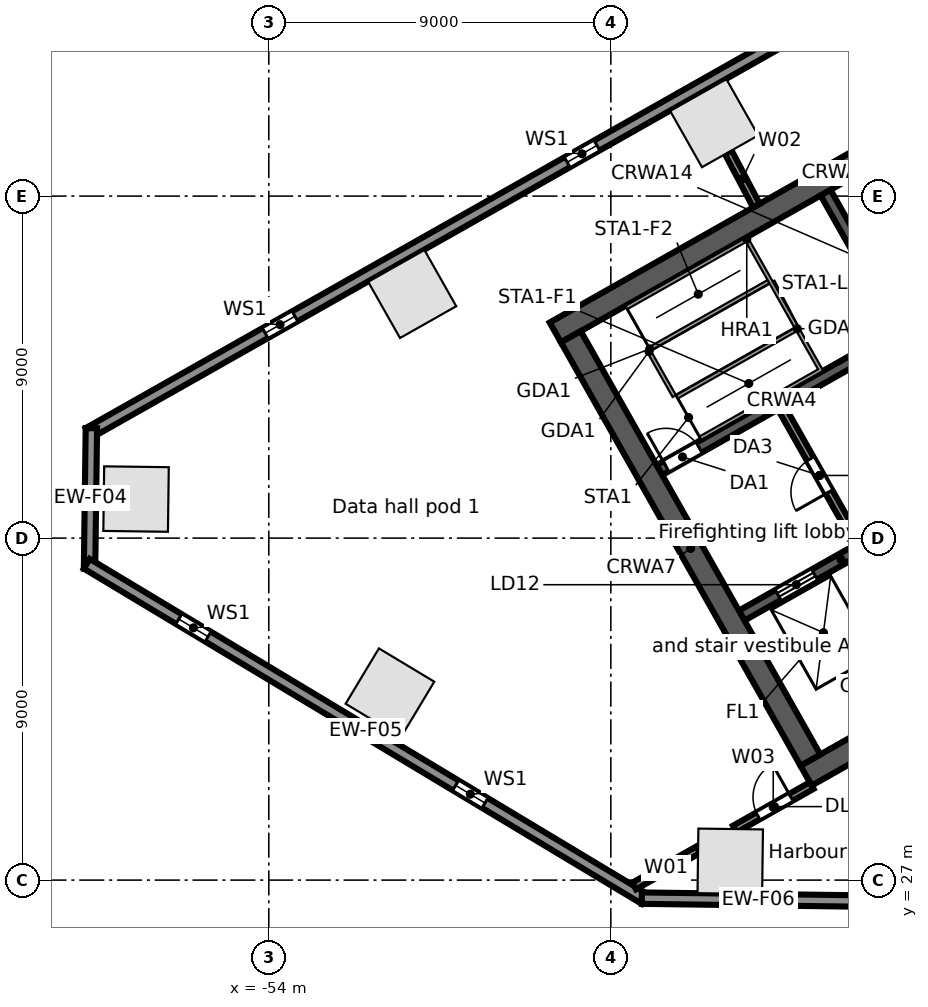
"""IFC4 building model, lengths in metres.
Left out: names, types, materials, properties, quantities, classifications, styles, units other than length and angle.
Written with IfcOpenShell. Run it as: python <this file> out.ifc"""

import sys

from ifc_helpers import new_model, si_unit, direction, frame, frame_2d, origin, origin_2d, place, context, subcontext, project, spatial, rectangle, extrude, element, fill, save


model = new_model("IFC4")
c1 = context("Model", 3, precision=1e-05, world=origin(), true_north=direction((0.0, 1.0)))
c2 = subcontext(c1, "Body", "Model", "MODEL_VIEW")
j1 = project(units=[si_unit("LENGTHUNIT", "METRE"), si_unit("PLANEANGLEUNIT", "RADIAN")], contexts=[c1])
p1 = place(None, origin())
s1 = spatial("IfcSite", under=j1, at=p1, CompositionType="ELEMENT")
p2 = place(p1, origin())
s2 = spatial("IfcBuilding", under=s1, at=p2, CompositionType="ELEMENT")
p3 = place(p2, frame((0.0, 0.0, 71.5)))
s3 = spatial("IfcBuildingStorey", under=s2, at=p3, CompositionType="ELEMENT", Elevation=71.5)
for number, where, z_axis, x_axis in (
    (1, (-42.28, 46.919, 0.0), (0.0, 0.0, 1.0), (-0.87, -0.492, 0.0)),
    (2, (-50.226, 42.423, 0.0), (0.0, 0.0, 1.0), (-0.87, -0.492, 0.0)),
    (3, (-57.493, 37.027, 0.0), (0.0, 0.0, 1.0), (-0.013, -1.0, 0.0)),
    (4, (-50.812, 31.931, 0.0), (0.0, 0.0, 1.0), (0.857, -0.515, 0.0)),
    (5, (-41.858, 27.495, 0.0), (0.0, 0.0, 1.0), (1.0, -0.013, 0.0)),
):
    element("IfcColumn", number, at=place(p3, frame(where, z_axis=z_axis, x_axis=x_axis)), inside=s3, PredefinedType="COLUMN", context=c2, shape_type="SweptSolid", body=[
        extrude(rectangle(XDim=1.7, YDim=1.7, at=origin_2d()), origin(), (0.0, 0.0, 1.0), 5.0),
    ])
p4 = place(p3, frame((-58.745, 38.764, 0.0), z_axis=(0.0, 0.0, 1.0), x_axis=(0.870355811726, 0.492423355453, 0.0)))
e6 = element("IfcWall", 6, at=p4, inside=s3, PredefinedType="STANDARD", context=c2, shape_type="SweptSolid", body=[
    extrude(rectangle(XDim=64.025, YDim=0.3, at=frame_2d((32.013, 0.0))), origin(), (0.0, 0.0, 1.0), 4.68),
])
p5 = place(p4, frame((60.122, 0.0, 0.6)))
e7 = element("IfcOpeningElement", 7, at=p5, cuts=e6, PredefinedType="OPENING", context=c2, shape_type="SweptSolid", body=[
    extrude(rectangle(XDim=0.9, YDim=3.2, at=frame_2d((0.45, 1.6))), frame((0.0, 0.16, 0.0), z_axis=(0.0, -1.0, 0.0), x_axis=(1.0, 0.0, 0.0)), (0.0, 0.0, 1.0), 0.32),
])
p6 = place(p4, frame((50.992, 0.0, 0.6)))
e8 = element("IfcOpeningElement", 8, at=p6, cuts=e6, PredefinedType="OPENING", context=c2, shape_type="SweptSolid", body=[
    extrude(rectangle(XDim=0.9, YDim=3.2, at=frame_2d((0.45, 1.6))), frame((0.0, 0.16, 0.0), z_axis=(0.0, -1.0, 0.0), x_axis=(1.0, 0.0, 0.0)), (0.0, 0.0, 1.0), 0.32),
])
p7 = place(p4, frame((41.862, 0.0, 0.6)))
e9 = element("IfcOpeningElement", 9, at=p7, cuts=e6, PredefinedType="OPENING", context=c2, shape_type="SweptSolid", body=[
    extrude(rectangle(XDim=0.9, YDim=3.2, at=frame_2d((0.45, 1.6))), frame((0.0, 0.16, 0.0), z_axis=(0.0, -1.0, 0.0), x_axis=(1.0, 0.0, 0.0)), (0.0, 0.0, 1.0), 0.32),
])
p8 = place(p4, frame((32.732, 0.0, 0.6)))
e10 = element("IfcOpeningElement", 10, at=p8, cuts=e6, PredefinedType="OPENING", context=c2, shape_type="SweptSolid", body=[
    extrude(rectangle(XDim=0.9, YDim=3.2, at=frame_2d((0.45, 1.6))), frame((0.0, 0.16, 0.0), z_axis=(0.0, -1.0, 0.0), x_axis=(1.0, 0.0, 0.0)), (0.0, 0.0, 1.0), 0.32),
])
p9 = place(p4, frame((23.602, 0.0, 0.6)))
e11 = element("IfcOpeningElement", 11, at=p9, cuts=e6, PredefinedType="OPENING", context=c2, shape_type="SweptSolid", body=[
    extrude(rectangle(XDim=0.9, YDim=3.2, at=frame_2d((0.45, 1.6))), frame((0.0, 0.16, 0.0), z_axis=(0.0, -1.0, 0.0), x_axis=(1.0, 0.0, 0.0)), (0.0, 0.0, 1.0), 0.32),
])
p10 = place(p4, frame((14.472, 0.0, 0.6)))
e12 = element("IfcOpeningElement", 12, at=p10, cuts=e6, PredefinedType="OPENING", context=c2, shape_type="SweptSolid", body=[
    extrude(rectangle(XDim=0.9, YDim=3.2, at=frame_2d((0.45, 1.6))), frame((0.0, 0.16, 0.0), z_axis=(0.0, -1.0, 0.0), x_axis=(1.0, 0.0, 0.0)), (0.0, 0.0, 1.0), 0.32),
])
p11 = place(p4, frame((5.342, 0.0, 0.6)))
e13 = element("IfcOpeningElement", 13, at=p11, cuts=e6, PredefinedType="OPENING", context=c2, shape_type="SweptSolid", body=[
    extrude(rectangle(XDim=0.9, YDim=3.2, at=frame_2d((0.45, 1.6))), frame((0.0, 0.16, 0.0), z_axis=(0.0, -1.0, 0.0), x_axis=(1.0, 0.0, 0.0)), (0.0, 0.0, 1.0), 0.32),
])
p12 = place(p3, frame((-58.717, 35.194, 0.0), z_axis=(0.0, 0.0, 1.0), x_axis=(0.013069053407, 0.999914596275, 0.0)))
e14 = element("IfcWall", 14, at=p12, inside=s3, PredefinedType="STANDARD", context=c2, shape_type="SweptSolid", body=[
    extrude(rectangle(XDim=3.699, YDim=0.3, at=frame_2d((1.849, 0.0))), origin(), (0.0, 0.0, 1.0), 4.68),
])
p13 = place(p3, frame((-44.109, 26.504, 0.0), z_axis=(0.0, 0.0, 1.0), x_axis=(-0.857169502585, 0.515034410344, 0.0)))
e15 = element("IfcWall", 15, at=p13, inside=s3, PredefinedType="STANDARD", context=c2, shape_type="SweptSolid", body=[
    extrude(rectangle(XDim=17.127, YDim=0.3, at=frame_2d((8.563, 0.0))), origin(), (0.0, 0.0, 1.0), 4.68),
])
p14 = place(p13, frame((13.403, 0.0, 0.6)))
e16 = element("IfcOpeningElement", 16, at=p14, cuts=e15, PredefinedType="OPENING", context=c2, shape_type="SweptSolid", body=[
    extrude(rectangle(XDim=0.9, YDim=3.2, at=frame_2d((0.45, 1.6))), frame((0.0, 0.16, 0.0), z_axis=(0.0, -1.0, 0.0), x_axis=(1.0, 0.0, 0.0)), (0.0, 0.0, 1.0), 0.32),
])
p15 = place(p13, frame((4.903, 0.0, 0.6)))
e17 = element("IfcOpeningElement", 17, at=p15, cuts=e15, PredefinedType="OPENING", context=c2, shape_type="SweptSolid", body=[
    extrude(rectangle(XDim=0.9, YDim=3.2, at=frame_2d((0.45, 1.6))), frame((0.0, 0.16, 0.0), z_axis=(0.0, -1.0, 0.0), x_axis=(1.0, 0.0, 0.0)), (0.0, 0.0, 1.0), 0.32),
])
p16 = place(p3, frame((-38.057, 26.445, 0.0), z_axis=(0.0, 0.0, 1.0), x_axis=(-0.999914086342, 0.013108010296, 0.0)))
e18 = element("IfcWall", 18, at=p16, inside=s3, PredefinedType="STANDARD", context=c2, shape_type="SweptSolid", body=[
    extrude(rectangle(XDim=6.128, YDim=0.3, at=frame_2d((3.064, 0.0))), origin(), (0.0, 0.0, 1.0), 4.68),
])
p17 = place(p3, frame((-39.862, 29.749, 0.0), z_axis=(0.0, 0.0, 1.0), x_axis=(0.870350116061, 0.492433422375, 0.0)))
e19 = element("IfcWall", 19, at=p17, inside=s3, PredefinedType="SOLIDWALL", context=c2, shape_type="SweptSolid", body=[
    extrude(rectangle(XDim=17.0, YDim=0.6, at=frame_2d((8.5, 0.0))), origin(), (0.0, 0.0, 1.0), 4.68),
])
p18 = place(p17, frame((7.2, 0.0, 0.0)))
e20 = element("IfcOpeningElement", 20, at=p18, cuts=e19, PredefinedType="OPENING", context=c2, shape_type="SweptSolid", body=[
    extrude(rectangle(XDim=1.2, YDim=2.1, at=frame_2d((0.6, 1.05))), frame((0.0, 0.31, 0.0), z_axis=(0.0, -1.0, 0.0), x_axis=(1.0, 0.0, 0.0)), (0.0, 0.0, 1.0), 0.62),
])
p19 = place(p3, frame((-41.556, 33.961, 0.0), z_axis=(0.0, 0.0, 1.0), x_axis=(0.870343731308, 0.492444706919, 0.0)))
e21 = element("IfcWall", 21, at=p19, inside=s3, PredefinedType="SOLIDWALL", context=c2, shape_type="SweptSolid", body=[
    extrude(rectangle(XDim=6.0, YDim=0.3, at=frame_2d((3.0, 0.0))), origin(), (0.0, 0.0, 1.0), 4.68),
])
p20 = place(p19, frame((1.1, 0.0, 0.0)))
e22 = element("IfcOpeningElement", 22, at=p20, cuts=e21, PredefinedType="OPENING", context=c2, shape_type="SweptSolid", body=[
    extrude(rectangle(XDim=1.1, YDim=2.1, at=frame_2d((0.55, 1.05))), frame((0.0, 0.16, 0.0), z_axis=(0.0, -1.0, 0.0), x_axis=(1.0, 0.0, 0.0)), (0.0, 0.0, 1.0), 0.32),
])
p21 = place(p19, frame((4.25, 0.0, 0.0)))
e23 = element("IfcOpeningElement", 23, at=p21, cuts=e21, PredefinedType="OPENING", context=c2, shape_type="SweptSolid", body=[
    extrude(rectangle(XDim=1.1, YDim=2.1, at=frame_2d((0.55, 1.05))), frame((0.0, 0.16, 0.0), z_axis=(0.0, -1.0, 0.0), x_axis=(1.0, 0.0, 0.0)), (0.0, 0.0, 1.0), 0.32),
])
p22 = place(p3, frame((-43.723, 37.791, 0.0), z_axis=(0.0, 0.0, 1.0), x_axis=(0.87035077051, 0.49243226567, 0.0)))
e24 = element("IfcWall", 24, at=p22, inside=s3, PredefinedType="SOLIDWALL", context=c2, shape_type="SweptSolid", body=[
    extrude(rectangle(XDim=7.4, YDim=0.3, at=frame_2d((3.7, 0.0))), origin(), (0.0, 0.0, 1.0), 4.68),
])
p23 = place(p22, frame((0.2, 0.0, 0.0)))
e25 = element("IfcOpeningElement", 25, at=p23, cuts=e24, PredefinedType="OPENING", context=c2, shape_type="SweptSolid", body=[
    extrude(rectangle(XDim=1.0, YDim=2.1, at=frame_2d((0.5, 1.05))), frame((0.0, 0.16, 0.0), z_axis=(0.0, -1.0, 0.0), x_axis=(1.0, 0.0, 0.0)), (0.0, 0.0, 1.0), 0.32),
])
p24 = place(p3, frame((-46.461, 41.412, 0.0), z_axis=(0.0, 0.0, 1.0), x_axis=(0.870350116061, 0.492433422375, 0.0)))
e26 = element("IfcWall", 26, at=p24, inside=s3, PredefinedType="SOLIDWALL", context=c2, shape_type="SweptSolid", body=[
    extrude(rectangle(XDim=17.0, YDim=0.6, at=frame_2d((8.5, 0.0))), origin(), (0.0, 0.0, 1.0), 4.68),
])
p25 = place(p3, frame((-46.052, 41.298, 0.0), z_axis=(0.0, 0.0, 1.0), x_axis=(0.492418598281, -0.870358503186, 0.0)))
e27 = element("IfcWall", 27, at=p25, inside=s3, PredefinedType="SOLIDWALL", context=c2, shape_type="SweptSolid", body=[
    extrude(rectangle(XDim=12.8, YDim=0.6, at=frame_2d((6.4, 0.0))), origin(), (0.0, 0.0, 1.0), 4.68),
])
p26 = place(p3, frame((-40.516, 39.433, 0.0), z_axis=(0.0, 0.0, 1.0), x_axis=(0.492453559952, -0.87033872216, 0.0)))
e28 = element("IfcWall", 28, at=p26, inside=s3, PredefinedType="PARTITIONING", context=c2, shape_type="SweptSolid", body=[
    extrude(rectangle(XDim=4.1, YDim=0.2, at=frame_2d((2.05, 0.0))), origin(), (0.0, 0.0, 1.0), 4.68),
])
p27 = place(p26, frame((1.55, 0.0, 0.0)))
e29 = element("IfcOpeningElement", 29, at=p27, cuts=e28, PredefinedType="OPENING", context=c2, shape_type="SweptSolid", body=[
    extrude(rectangle(XDim=1.0, YDim=2.1, at=frame_2d((0.5, 1.05))), frame((0.0, 0.11, 0.0), z_axis=(0.0, -1.0, 0.0), x_axis=(1.0, 0.0, 0.0)), (0.0, 0.0, 1.0), 0.22),
])
p28 = place(p3, frame((-39.35, 45.09, 0.0), z_axis=(0.0, 0.0, 1.0), x_axis=(0.49241474071, -0.870360685654, 0.0)))
e30 = element("IfcWall", 30, at=p28, inside=s3, PredefinedType="SOLIDWALL", context=c2, shape_type="SweptSolid", body=[
    extrude(rectangle(XDim=4.05, YDim=0.3, at=frame_2d((2.025, 0.0))), origin(), (0.0, 0.0, 1.0), 4.68),
])
p29 = place(p3, frame((-44.386, 26.845, 0.0), z_axis=(0.0, 0.0, 1.0), x_axis=(0.870226201187, 0.492652371118, 0.0)))
e31 = element("IfcWall", 31, at=p29, inside=s3, PredefinedType="PARTITIONING", context=c2, shape_type="SweptSolid", body=[
    extrude(rectangle(XDim=1.933, YDim=0.2, at=frame_2d((0.966, 0.0))), origin(), (0.0, 0.0, 1.0), 4.68),
])
p30 = place(p3, frame((-41.909, 46.152, 0.0), z_axis=(0.0, 0.0, 1.0), x_axis=(0.466755273883, -0.884386518612, 0.0)))
e32 = element("IfcWall", 32, at=p30, inside=s3, PredefinedType="PARTITIONING", context=c2, shape_type="SweptSolid", body=[
    extrude(rectangle(XDim=1.585, YDim=0.2, at=frame_2d((0.793, 0.0))), origin(), (0.0, 0.0, 1.0), 4.26),
])
p31 = place(p3, frame((-41.738, 28.343, 0.0), z_axis=(0.0, 0.0, 1.0), x_axis=(0.870265350095, 0.492583211676, 0.0)))
e33 = element("IfcWall", 33, at=p31, inside=s3, PredefinedType="PARTITIONING", context=c2, shape_type="SweptSolid", body=[
    extrude(rectangle(XDim=2.324, YDim=0.2, at=frame_2d((1.162, 0.0))), origin(), (0.0, 0.0, 1.0), 4.68),
])
p32 = place(p31, frame((0.7, 0.0, 0.0)))
e34 = element("IfcOpeningElement", 34, at=p32, cuts=e33, PredefinedType="OPENING", context=c2, shape_type="SweptSolid", body=[
    extrude(rectangle(XDim=1.0, YDim=2.1, at=frame_2d((0.5, 1.05))), frame((0.0, 0.11, 0.0), z_axis=(0.0, -1.0, 0.0), x_axis=(1.0, 0.0, 0.0)), (0.0, 0.0, 1.0), 0.22),
])
p33 = place(p10, origin())
e35 = element("IfcWindow", 35, at=p33, inside=s3, PartitioningType="SINGLE_PANEL", PredefinedType="WINDOW", context=c2, shape_type="SweptSolid", body=[
    extrude(rectangle(XDim=0.9, YDim=3.2, at=frame_2d((0.45, 1.6))), frame((0.0, 0.03, 0.0), z_axis=(0.0, -1.0, 0.0), x_axis=(1.0, 0.0, 0.0)), (0.0, 0.0, 1.0), 0.06),
])
fill(e12, e35)
p34 = place(p11, origin())
e36 = element("IfcWindow", 36, at=p34, inside=s3, PartitioningType="SINGLE_PANEL", PredefinedType="WINDOW", context=c2, shape_type="SweptSolid", body=[
    extrude(rectangle(XDim=0.9, YDim=3.2, at=frame_2d((0.45, 1.6))), frame((0.0, 0.03, 0.0), z_axis=(0.0, -1.0, 0.0), x_axis=(1.0, 0.0, 0.0)), (0.0, 0.0, 1.0), 0.06),
])
fill(e13, e36)
p35 = place(p14, origin())
e37 = element("IfcWindow", 37, at=p35, inside=s3, PartitioningType="SINGLE_PANEL", PredefinedType="WINDOW", context=c2, shape_type="SweptSolid", body=[
    extrude(rectangle(XDim=0.9, YDim=3.2, at=frame_2d((0.45, 1.6))), frame((0.0, 0.03, 0.0), z_axis=(0.0, -1.0, 0.0), x_axis=(1.0, 0.0, 0.0)), (0.0, 0.0, 1.0), 0.06),
])
fill(e16, e37)
p36 = place(p15, origin())
e38 = element("IfcWindow", 38, at=p36, inside=s3, PartitioningType="SINGLE_PANEL", PredefinedType="WINDOW", context=c2, shape_type="SweptSolid", body=[
    extrude(rectangle(XDim=0.9, YDim=3.2, at=frame_2d((0.45, 1.6))), frame((0.0, 0.03, 0.0), z_axis=(0.0, -1.0, 0.0), x_axis=(1.0, 0.0, 0.0)), (0.0, 0.0, 1.0), 0.06),
])
fill(e17, e38)
p37 = place(p20, origin())
e39 = element("IfcDoor", 39, at=p37, inside=s3, OperationType="DOUBLE_DOOR_SLIDING", PredefinedType="DOOR", context=c2, shape_type="SweptSolid", body=[
    extrude(rectangle(XDim=1.1, YDim=2.1, at=frame_2d((0.55, 1.05))), frame((0.0, 0.025, 0.0), z_axis=(0.0, -1.0, 0.0), x_axis=(1.0, 0.0, 0.0)), (0.0, 0.0, 1.0), 0.05),
])
fill(e22, e39)
p38 = place(p23, origin())
e40 = element("IfcDoor", 40, at=p38, inside=s3, OperationType="SINGLE_SWING_LEFT", PredefinedType="DOOR", context=c2, shape_type="SweptSolid", body=[
    extrude(rectangle(XDim=1.0, YDim=2.1, at=frame_2d((0.5, 1.05))), frame((0.0, 0.025, 0.0), z_axis=(0.0, -1.0, 0.0), x_axis=(1.0, 0.0, 0.0)), (0.0, 0.0, 1.0), 0.05),
])
fill(e25, e40)
p39 = place(p27, frame((1.0, 0.0, 0.0), z_axis=(0.0, 0.0, 1.0), x_axis=(-1.0, 0.0, 0.0)))
e41 = element("IfcDoor", 41, at=p39, inside=s3, OperationType="SINGLE_SWING_LEFT", PredefinedType="DOOR", context=c2, shape_type="SweptSolid", body=[
    extrude(rectangle(XDim=1.0, YDim=2.1, at=frame_2d((0.5, 1.05))), frame((0.0, 0.025, 0.0), z_axis=(0.0, -1.0, 0.0), x_axis=(1.0, 0.0, 0.0)), (0.0, 0.0, 1.0), 0.05),
])
fill(e29, e41)
p40 = place(p32, origin())
e42 = element("IfcDoor", 42, at=p40, inside=s3, OperationType="SINGLE_SWING_RIGHT", PredefinedType="DOOR", context=c2, shape_type="SweptSolid", body=[
    extrude(rectangle(XDim=1.0, YDim=2.1, at=frame_2d((0.5, 1.05))), frame((0.0, 0.025, 0.0), z_axis=(0.0, -1.0, 0.0), x_axis=(1.0, 0.0, 0.0)), (0.0, 0.0, 1.0), 0.05),
])
fill(e34, e42)
save(model, sys.argv[1])
